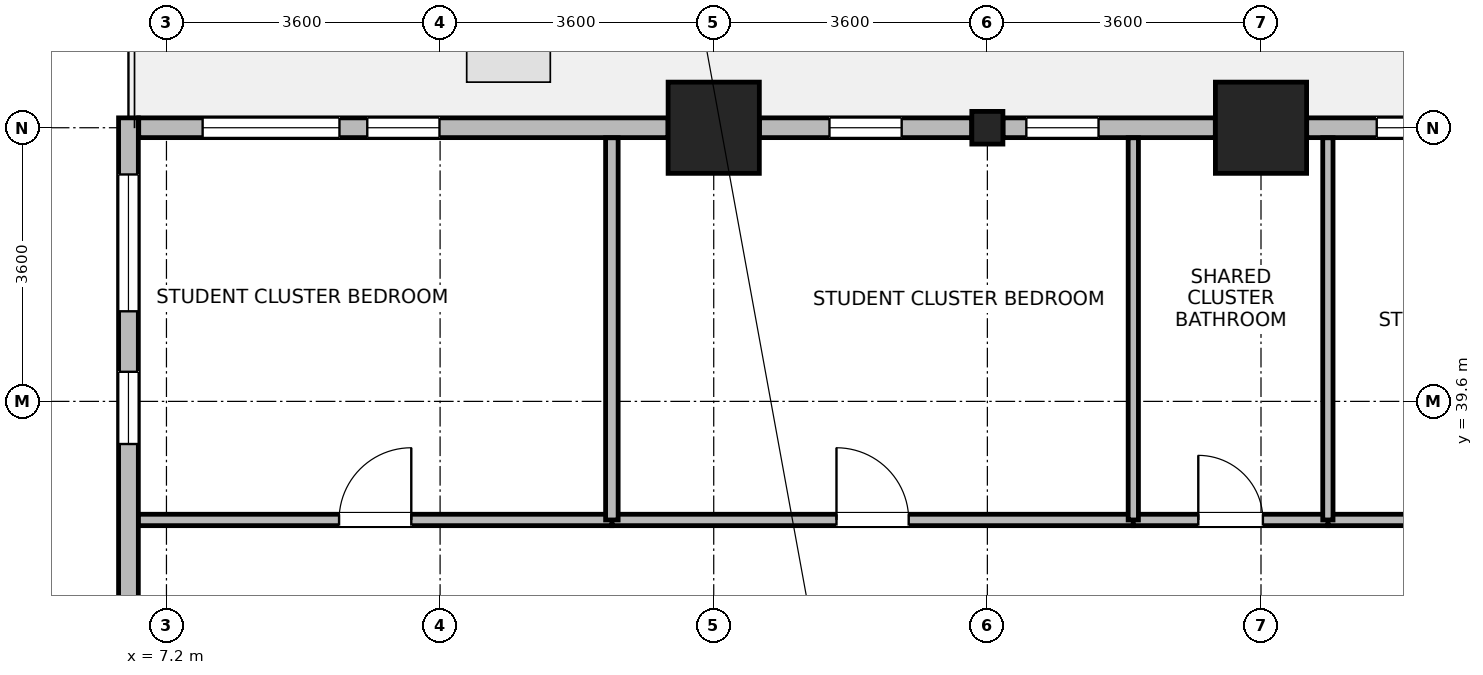
"""IFC4 building model, lengths in metres.
Left out: names, types, materials, properties, quantities, classifications, styles, units other than length and angle.
Written with IfcOpenShell. Run it as: python <this file> out.ifc"""

import sys

from ifc_helpers import new_model, si_unit, direction, frame, frame_2d, origin, origin_2d, place, context, subcontext, project, spatial, rectangle, i_section, extrude, source, transform, mapped, element, fill, save


model = new_model("IFC4")
c1 = context("Model", 3, precision=1e-05, world=origin(), true_north=direction((0.0, 1.0)))
c2 = subcontext(c1, "Body", "Model", "MODEL_VIEW")
j1 = project(units=[si_unit("LENGTHUNIT", "METRE"), si_unit("PLANEANGLEUNIT", "RADIAN")], contexts=[c1])
p1 = place(None, origin())
s1 = spatial("IfcSite", under=j1, at=p1, CompositionType="ELEMENT")
p2 = place(p1, origin())
s2 = spatial("IfcBuilding", under=s1, at=p2, CompositionType="ELEMENT")
p3 = place(p2, frame((0.0, 0.0, 89.7)))
s3 = spatial("IfcBuildingStorey", under=s2, at=p3, CompositionType="ELEMENT", Elevation=89.7)
m1 = source(origin(), c2, "Body", "SweptSolid", [
    extrude(rectangle(XDim=1.2, YDim=1.2, at=origin_2d()), origin(), (0.0, 0.0, 1.0), 3.7),
])
for number, where, z_axis, x_axis in (
    (1, (14.4, 43.2, 0.0), (0.0, 0.0, 1.0), (1.0, 0.0, 0.0)),
    (2, (21.6, 43.2, 0.0), (0.0, 0.0, 1.0), (1.0, 0.0, 0.0)),
):
    element("IfcColumn", number, at=place(p3, frame(where, z_axis=z_axis, x_axis=x_axis)), inside=s3, PredefinedType="COLUMN", context=c2, shape_type="MappedRepresentation", body=[
        mapped(m1, transform((0.0, 0.0, 0.0), x_axis=(1.0, 0.0, 0.0), y_axis=(0.0, 1.0, 0.0), z_axis=(0.0, 0.0, 1.0), scale=1.0)),
    ])
m2 = source(origin(), c2, "Body", "SweptSolid", [
    extrude(i_section(OverallWidth=0.409, OverallDepth=0.43, WebThickness=0.024, FlangeThickness=0.033, FilletRadius=0.015, at=origin_2d()), origin(), (0.0, 0.0, 1.0), 3.7),
])
p4 = place(p3, frame((18.0, 43.2, 0.0), z_axis=(0.0, 0.0, 1.0), x_axis=(1.0, 0.0, 0.0)))
e3 = element("IfcColumn", 3, at=p4, inside=s3, PredefinedType="COLUMN", context=c2, shape_type="MappedRepresentation", body=[
    mapped(m2, transform((0.0, 0.0, 0.0), x_axis=(1.0, 0.0, 0.0), y_axis=(0.0, 1.0, 0.0), z_axis=(0.0, 0.0, 1.0), scale=1.0)),
])
p5 = place(p3, frame((22.201, 43.2, 0.0), z_axis=(0.0, 0.0, 1.0), x_axis=(1.0, 0.0, 0.0)))
e4 = element("IfcWall", 4, at=p5, inside=s3, PredefinedType="STANDARD", context=c2, shape_type="SweptSolid", body=[
    extrude(rectangle(XDim=2.793, YDim=0.26, at=frame_2d((1.397, 0.0))), origin(), (0.0, 0.0, 1.0), 2.93),
])
p6 = place(p5, frame((0.922, 0.0, 0.85)))
e5 = element("IfcOpeningElement", 5, at=p6, cuts=e4, PredefinedType="OPENING", context=c2, shape_type="SweptSolid", body=[
    extrude(rectangle(XDim=0.95, YDim=1.75, at=frame_2d((0.475, 0.875))), frame((0.0, 0.14, 0.0), z_axis=(0.0, -1.0, 0.0), x_axis=(1.0, 0.0, 0.0)), (0.0, 0.0, 1.0), 0.28),
])
p7 = place(p3, frame((18.206, 43.2, 0.0), z_axis=(0.0, 0.0, 1.0), x_axis=(1.0, 0.0, 0.0)))
e6 = element("IfcWall", 6, at=p7, inside=s3, PredefinedType="STANDARD", context=c2, shape_type="SweptSolid", body=[
    extrude(rectangle(XDim=2.793, YDim=0.26, at=frame_2d((1.397, 0.0))), origin(), (0.0, 0.0, 1.0), 2.93),
])
p8 = place(p7, frame((0.307, 0.0, 0.85)))
e7 = element("IfcOpeningElement", 7, at=p8, cuts=e6, PredefinedType="OPENING", context=c2, shape_type="SweptSolid", body=[
    extrude(rectangle(XDim=0.95, YDim=1.75, at=frame_2d((0.475, 0.875))), frame((0.0, 0.14, 0.0), z_axis=(0.0, -1.0, 0.0), x_axis=(1.0, 0.0, 0.0)), (0.0, 0.0, 1.0), 0.28),
])
p9 = place(p3, frame((15.001, 43.2, 0.0), z_axis=(0.0, 0.0, 1.0), x_axis=(1.0, 0.0, 0.0)))
e8 = element("IfcWall", 8, at=p9, inside=s3, PredefinedType="STANDARD", context=c2, shape_type="SweptSolid", body=[
    extrude(rectangle(XDim=2.793, YDim=0.26, at=frame_2d((1.397, 0.0))), origin(), (0.0, 0.0, 1.0), 2.93),
])
p10 = place(p9, frame((0.922, 0.0, 0.85)))
e9 = element("IfcOpeningElement", 9, at=p10, cuts=e8, PredefinedType="OPENING", context=c2, shape_type="SweptSolid", body=[
    extrude(rectangle(XDim=0.95, YDim=1.75, at=frame_2d((0.475, 0.875))), frame((0.0, 0.14, 0.0), z_axis=(0.0, -1.0, 0.0), x_axis=(1.0, 0.0, 0.0)), (0.0, 0.0, 1.0), 0.28),
])
p11 = place(p3, frame((6.835, 43.2, 0.0), z_axis=(0.0, 0.0, 1.0), x_axis=(1.0, 0.0, 0.0)))
e10 = element("IfcWall", 10, at=p11, inside=s3, PredefinedType="STANDARD", context=c2, shape_type="SweptSolid", body=[
    extrude(rectangle(XDim=6.964, YDim=0.26, at=frame_2d((3.482, 0.0))), origin(), (0.0, 0.0, 1.0), 3.43),
])
p12 = place(p11, frame((0.841, 0.0, 0.85)))
e11 = element("IfcOpeningElement", 11, at=p12, cuts=e10, PredefinedType="OPENING", context=c2, shape_type="SweptSolid", body=[
    extrude(rectangle(XDim=1.8, YDim=1.85, at=frame_2d((0.9, 0.925))), frame((0.0, 0.14, 0.0), z_axis=(0.0, -1.0, 0.0), x_axis=(1.0, 0.0, 0.0)), (0.0, 0.0, 1.0), 0.28),
])
p13 = place(p11, frame((3.007, 0.0, 0.85)))
e12 = element("IfcOpeningElement", 12, at=p13, cuts=e10, PredefinedType="OPENING", context=c2, shape_type="SweptSolid", body=[
    extrude(rectangle(XDim=0.95, YDim=1.75, at=frame_2d((0.475, 0.875))), frame((0.0, 0.14, 0.0), z_axis=(0.0, -1.0, 0.0), x_axis=(1.0, 0.0, 0.0)), (0.0, 0.0, 1.0), 0.28),
])
p14 = place(p3, frame((6.7, 36.751, 0.0), z_axis=(0.0, 0.0, 1.0), x_axis=(0.0, 1.0, 0.0)))
e13 = element("IfcWall", 13, at=p14, inside=s3, PredefinedType="STANDARD", context=c2, shape_type="SweptSolid", body=[
    extrude(rectangle(XDim=6.579, YDim=0.26, at=frame_2d((3.29, 0.0))), origin(), (0.0, 0.0, 1.0), 3.43),
])
p15 = place(p14, frame((4.034, 0.0, 0.85)))
e14 = element("IfcOpeningElement", 14, at=p15, cuts=e13, PredefinedType="OPENING", context=c2, shape_type="SweptSolid", body=[
    extrude(rectangle(XDim=1.8, YDim=1.85, at=frame_2d((0.9, 0.925))), frame((0.0, 0.14, 0.0), z_axis=(0.0, -1.0, 0.0), x_axis=(1.0, 0.0, 0.0)), (0.0, 0.0, 1.0), 0.28),
])
p16 = place(p14, frame((2.288, 0.0, 0.85)))
e15 = element("IfcOpeningElement", 15, at=p16, cuts=e13, PredefinedType="OPENING", context=c2, shape_type="SweptSolid", body=[
    extrude(rectangle(XDim=0.95, YDim=1.75, at=frame_2d((0.475, 0.875))), frame((0.0, 0.14, 0.0), z_axis=(0.0, -1.0, 0.0), x_axis=(1.0, 0.0, 0.0)), (0.0, 0.0, 1.0), 0.28),
])
p17 = place(p3, frame((22.48, 38.04, 0.0), z_axis=(0.0, 0.0, 1.0), x_axis=(1.0, 0.0, 0.0)))
e16 = element("IfcWall", 16, at=p17, inside=s3, PredefinedType="PARTITIONING", context=c2, shape_type="SweptSolid", body=[
    extrude(rectangle(XDim=9.86, YDim=0.15, at=frame_2d((4.93, 0.0))), origin(), (0.0, 0.0, 1.0), 3.43),
])
p18 = place(p17, frame((4.455, 0.0, 0.0)))
e17 = element("IfcOpeningElement", 17, at=p18, cuts=e16, PredefinedType="OPENING", context=c2, shape_type="SweptSolid", body=[
    extrude(rectangle(XDim=0.95, YDim=2.1, at=frame_2d((0.475, 1.05))), frame((0.0, 0.085, 0.0), z_axis=(0.0, -1.0, 0.0), x_axis=(1.0, 0.0, 0.0)), (0.0, 0.0, 1.0), 0.17),
])
p19 = place(p3, frame((13.06, 38.04, 0.0), z_axis=(0.0, 0.0, 1.0), x_axis=(1.0, 0.0, 0.0)))
e18 = element("IfcWall", 18, at=p19, inside=s3, PredefinedType="PARTITIONING", context=c2, shape_type="SweptSolid", body=[
    extrude(rectangle(XDim=6.86, YDim=0.15, at=frame_2d((3.43, 0.0))), origin(), (0.0, 0.0, 1.0), 3.43),
])
p20 = place(p19, frame((2.955, 0.0, 0.0)))
e19 = element("IfcOpeningElement", 19, at=p20, cuts=e18, PredefinedType="OPENING", context=c2, shape_type="SweptSolid", body=[
    extrude(rectangle(XDim=0.95, YDim=2.1, at=frame_2d((0.475, 1.05))), frame((0.0, 0.085, 0.0), z_axis=(0.0, -1.0, 0.0), x_axis=(1.0, 0.0, 0.0)), (0.0, 0.0, 1.0), 0.17),
])
p21 = place(p3, frame((6.832, 38.04, 0.0), z_axis=(0.0, 0.0, 1.0), x_axis=(1.0, 0.0, 0.0)))
e20 = element("IfcWall", 20, at=p21, inside=s3, PredefinedType="PARTITIONING", context=c2, shape_type="SweptSolid", body=[
    extrude(rectangle(XDim=6.228, YDim=0.15, at=frame_2d((3.114, 0.0))), origin(), (0.0, 0.0, 1.0), 3.43),
])
p22 = place(p21, frame((2.639, 0.0, 0.0)))
e21 = element("IfcOpeningElement", 21, at=p22, cuts=e20, PredefinedType="OPENING", context=c2, shape_type="SweptSolid", body=[
    extrude(rectangle(XDim=0.95, YDim=2.1, at=frame_2d((0.475, 1.05))), frame((0.0, 0.085, 0.0), z_axis=(0.0, -1.0, 0.0), x_axis=(1.0, 0.0, 0.0)), (0.0, 0.0, 1.0), 0.17),
])
p23 = place(p3, frame((19.92, 38.04, 0.0), z_axis=(0.0, 0.0, 1.0), x_axis=(1.0, 0.0, 0.0)))
e22 = element("IfcWall", 22, at=p23, inside=s3, PredefinedType="PARTITIONING", context=c2, shape_type="SweptSolid", body=[
    extrude(rectangle(XDim=2.56, YDim=0.15, at=frame_2d((1.28, 0.0))), origin(), (0.0, 0.0, 1.0), 3.43),
])
p24 = place(p23, frame((0.855, 0.0, 0.0)))
e23 = element("IfcOpeningElement", 23, at=p24, cuts=e22, PredefinedType="OPENING", context=c2, shape_type="SweptSolid", body=[
    extrude(rectangle(XDim=0.85, YDim=2.04, at=frame_2d((0.425, 1.02))), frame((0.0, 0.085, 0.0), z_axis=(0.0, -1.0, 0.0), x_axis=(1.0, 0.0, 0.0)), (0.0, 0.0, 1.0), 0.17),
])
p25 = place(p3, frame((13.06, 38.04, 0.0), z_axis=(0.0, 0.0, 1.0), x_axis=(0.0, 1.0, 0.0)))
e24 = element("IfcWall", 24, at=p25, inside=s3, PredefinedType="PARTITIONING", context=c2, shape_type="SweptSolid", body=[
    extrude(rectangle(XDim=5.028, YDim=0.165, at=frame_2d((2.514, 0.0))), origin(), (0.0, 0.0, 1.0), 3.43),
])
for number, where, z_axis, x_axis in (
    (25, (19.92, 38.04, 0.0), (0.0, 0.0, 1.0), (0.0, 1.0, 0.0)),
    (26, (22.48, 38.04, 0.0), (0.0, 0.0, 1.0), (0.0, 1.0, 0.0)),
):
    element("IfcWall", number, at=place(p3, frame(where, z_axis=z_axis, x_axis=x_axis)), inside=s3, PredefinedType="PARTITIONING", context=c2, shape_type="SweptSolid", body=[
        extrude(rectangle(XDim=5.028, YDim=0.135, at=frame_2d((2.514, 0.0))), origin(), (0.0, 0.0, 1.0), 3.43),
    ])
p26 = place(p6, origin())
e27 = element("IfcWindow", 27, at=p26, inside=s3, PartitioningType="SINGLE_PANEL", PredefinedType="WINDOW", context=c2, shape_type="SweptSolid", body=[
    extrude(rectangle(XDim=0.95, YDim=1.75, at=frame_2d((0.475, 0.875))), frame((0.0, 0.03, 0.0), z_axis=(0.0, -1.0, 0.0), x_axis=(1.0, 0.0, 0.0)), (0.0, 0.0, 1.0), 0.06),
])
fill(e5, e27)
p27 = place(p8, origin())
e28 = element("IfcWindow", 28, at=p27, inside=s3, PartitioningType="SINGLE_PANEL", PredefinedType="WINDOW", context=c2, shape_type="SweptSolid", body=[
    extrude(rectangle(XDim=0.95, YDim=1.75, at=frame_2d((0.475, 0.875))), frame((0.0, 0.03, 0.0), z_axis=(0.0, -1.0, 0.0), x_axis=(1.0, 0.0, 0.0)), (0.0, 0.0, 1.0), 0.06),
])
fill(e7, e28)
p28 = place(p10, origin())
e29 = element("IfcWindow", 29, at=p28, inside=s3, PartitioningType="SINGLE_PANEL", PredefinedType="WINDOW", context=c2, shape_type="SweptSolid", body=[
    extrude(rectangle(XDim=0.95, YDim=1.75, at=frame_2d((0.475, 0.875))), frame((0.0, 0.03, 0.0), z_axis=(0.0, -1.0, 0.0), x_axis=(1.0, 0.0, 0.0)), (0.0, 0.0, 1.0), 0.06),
])
fill(e9, e29)
p29 = place(p12, origin())
e30 = element("IfcWindow", 30, at=p29, inside=s3, PartitioningType="SINGLE_PANEL", PredefinedType="WINDOW", context=c2, shape_type="SweptSolid", body=[
    extrude(rectangle(XDim=1.8, YDim=1.85, at=frame_2d((0.9, 0.925))), frame((0.0, 0.03, 0.0), z_axis=(0.0, -1.0, 0.0), x_axis=(1.0, 0.0, 0.0)), (0.0, 0.0, 1.0), 0.06),
])
fill(e11, e30)
p30 = place(p13, origin())
e31 = element("IfcWindow", 31, at=p30, inside=s3, PartitioningType="SINGLE_PANEL", PredefinedType="WINDOW", context=c2, shape_type="SweptSolid", body=[
    extrude(rectangle(XDim=0.95, YDim=1.75, at=frame_2d((0.475, 0.875))), frame((0.0, 0.03, 0.0), z_axis=(0.0, -1.0, 0.0), x_axis=(1.0, 0.0, 0.0)), (0.0, 0.0, 1.0), 0.06),
])
fill(e12, e31)
p31 = place(p15, origin())
e32 = element("IfcWindow", 32, at=p31, inside=s3, PartitioningType="SINGLE_PANEL", PredefinedType="WINDOW", context=c2, shape_type="SweptSolid", body=[
    extrude(rectangle(XDim=1.8, YDim=1.85, at=frame_2d((0.9, 0.925))), frame((0.0, 0.03, 0.0), z_axis=(0.0, -1.0, 0.0), x_axis=(1.0, 0.0, 0.0)), (0.0, 0.0, 1.0), 0.06),
])
fill(e14, e32)
p32 = place(p16, origin())
e33 = element("IfcWindow", 33, at=p32, inside=s3, PartitioningType="SINGLE_PANEL", PredefinedType="WINDOW", context=c2, shape_type="SweptSolid", body=[
    extrude(rectangle(XDim=0.95, YDim=1.75, at=frame_2d((0.475, 0.875))), frame((0.0, 0.03, 0.0), z_axis=(0.0, -1.0, 0.0), x_axis=(1.0, 0.0, 0.0)), (0.0, 0.0, 1.0), 0.06),
])
fill(e15, e33)
p33 = place(p20, origin())
e34 = element("IfcDoor", 34, at=p33, inside=s3, OperationType="SINGLE_SWING_LEFT", PredefinedType="DOOR", context=c2, shape_type="SweptSolid", body=[
    extrude(rectangle(XDim=0.95, YDim=2.1, at=frame_2d((0.475, 1.05))), frame((0.0, 0.025, 0.0), z_axis=(0.0, -1.0, 0.0), x_axis=(1.0, 0.0, 0.0)), (0.0, 0.0, 1.0), 0.05),
])
fill(e19, e34)
p34 = place(p22, origin())
e35 = element("IfcDoor", 35, at=p34, inside=s3, OperationType="SINGLE_SWING_RIGHT", PredefinedType="DOOR", context=c2, shape_type="SweptSolid", body=[
    extrude(rectangle(XDim=0.95, YDim=2.1, at=frame_2d((0.475, 1.05))), frame((0.0, 0.025, 0.0), z_axis=(0.0, -1.0, 0.0), x_axis=(1.0, 0.0, 0.0)), (0.0, 0.0, 1.0), 0.05),
])
fill(e21, e35)
p35 = place(p24, origin())
e36 = element("IfcDoor", 36, at=p35, inside=s3, OperationType="SINGLE_SWING_LEFT", PredefinedType="DOOR", context=c2, shape_type="SweptSolid", body=[
    extrude(rectangle(XDim=0.85, YDim=2.04, at=frame_2d((0.425, 1.02))), frame((0.0, 0.025, 0.0), z_axis=(0.0, -1.0, 0.0), x_axis=(1.0, 0.0, 0.0)), (0.0, 0.0, 1.0), 0.05),
])
fill(e23, e36)
save(model, sys.argv[1])
